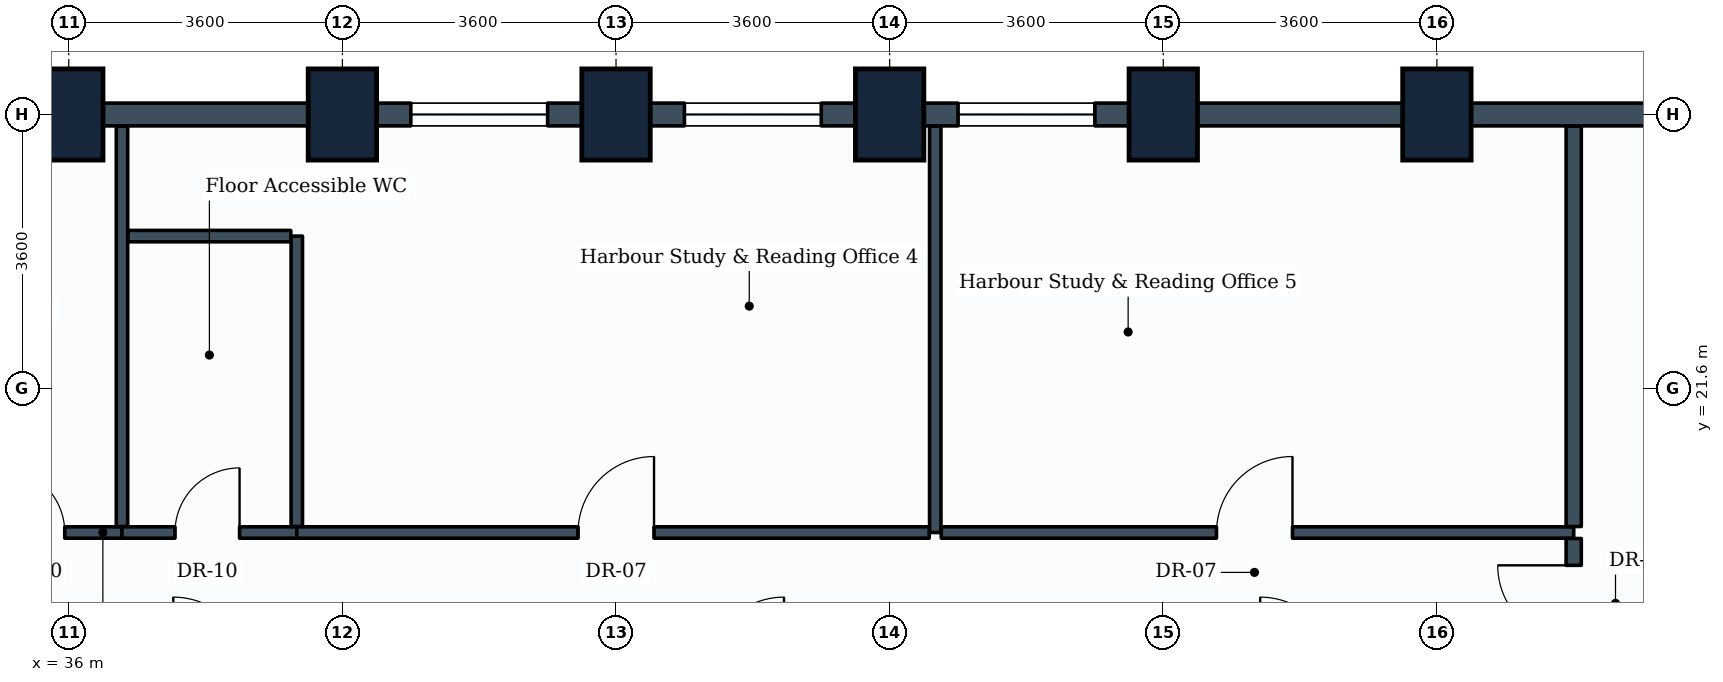
"""IFC4 building model, lengths in metres.
Left out: names, types, materials, properties, quantities, classifications, styles, units other than length and angle.
Written with IfcOpenShell. Run it as: python <this file> out.ifc"""

import sys

from ifc_helpers import new_model, si_unit, direction, frame, frame_2d, origin, origin_2d, place, context, subcontext, project, spatial, rectangle, extrude, element, fill, save


model = new_model("IFC4")
c1 = context("Model", 3, precision=1e-05, world=origin(), true_north=direction((0.0, 1.0)))
c2 = subcontext(c1, "Body", "Model", "MODEL_VIEW")
j1 = project(units=[si_unit("LENGTHUNIT", "METRE"), si_unit("PLANEANGLEUNIT", "RADIAN")], contexts=[c1])
p1 = place(None, origin())
s1 = spatial("IfcSite", under=j1, at=p1, CompositionType="ELEMENT")
p2 = place(p1, origin())
s2 = spatial("IfcBuilding", under=s1, at=p2, CompositionType="ELEMENT")
p3 = place(p2, frame((0.0, 0.0, 47.4)))
s3 = spatial("IfcBuildingStorey", under=s2, at=p3, CompositionType="ELEMENT", Elevation=47.4)
for number, where, z_axis, x_axis in (
    (1, (36.0, 25.2, 0.0), (0.0, 0.0, 1.0), (1.0, 0.0, 0.0)),
    (2, (39.6, 25.2, 0.0), (0.0, 0.0, 1.0), (1.0, 0.0, 0.0)),
    (3, (43.2, 25.2, 0.0), (0.0, 0.0, 1.0), (1.0, 0.0, 0.0)),
    (4, (46.8, 25.2, 0.0), (0.0, 0.0, 1.0), (1.0, 0.0, 0.0)),
    (5, (50.4, 25.2, 0.0), (0.0, 0.0, 1.0), (1.0, 0.0, 0.0)),
    (6, (54.0, 25.2, 0.0), (0.0, 0.0, 1.0), (1.0, 0.0, 0.0)),
):
    element("IfcColumn", number, at=place(p3, frame(where, z_axis=z_axis, x_axis=x_axis)), inside=s3, PredefinedType="COLUMN", context=c2, shape_type="SweptSolid", body=[
        extrude(rectangle(XDim=0.9, YDim=1.2, at=origin_2d()), origin(), (0.0, 0.0, 1.0), 3.9),
    ])
for number, where, z_axis, x_axis in (
    (7, (54.0, 25.2, 0.0), (0.0, 0.0, 1.0), (1.0, 0.0, 0.0)),
    (8, (50.4, 25.2, 0.0), (0.0, 0.0, 1.0), (1.0, 0.0, 0.0)),
):
    element("IfcWall", number, at=place(p3, frame(where, z_axis=z_axis, x_axis=x_axis)), inside=s3, PredefinedType="STANDARD", context=c2, shape_type="SweptSolid", body=[
        extrude(rectangle(XDim=3.6, YDim=0.3, at=frame_2d((1.8, 0.0))), origin(), (0.0, 0.0, 1.0), 2.93),
    ])
p4 = place(p3, frame((46.8, 25.2, 0.0), z_axis=(0.0, 0.0, 1.0), x_axis=(1.0, 0.0, 0.0)))
e9 = element("IfcWall", 9, at=p4, inside=s3, PredefinedType="STANDARD", context=c2, shape_type="SweptSolid", body=[
    extrude(rectangle(XDim=3.6, YDim=0.3, at=frame_2d((1.8, 0.0))), origin(), (0.0, 0.0, 1.0), 2.93),
])
p5 = place(p4, frame((0.9, 0.0, 0.85)))
e10 = element("IfcOpeningElement", 10, at=p5, cuts=e9, PredefinedType="OPENING", context=c2, shape_type="SweptSolid", body=[
    extrude(rectangle(XDim=1.8, YDim=1.35, at=frame_2d((0.9, 0.675))), frame((0.0, 0.16, 0.0), z_axis=(0.0, -1.0, 0.0), x_axis=(1.0, 0.0, 0.0)), (0.0, 0.0, 1.0), 0.32),
])
p6 = place(p3, frame((43.2, 25.2, 0.0), z_axis=(0.0, 0.0, 1.0), x_axis=(1.0, 0.0, 0.0)))
e11 = element("IfcWall", 11, at=p6, inside=s3, PredefinedType="STANDARD", context=c2, shape_type="SweptSolid", body=[
    extrude(rectangle(XDim=3.6, YDim=0.3, at=frame_2d((1.8, 0.0))), origin(), (0.0, 0.0, 1.0), 2.93),
])
p7 = place(p6, frame((0.9, 0.0, 0.85)))
e12 = element("IfcOpeningElement", 12, at=p7, cuts=e11, PredefinedType="OPENING", context=c2, shape_type="SweptSolid", body=[
    extrude(rectangle(XDim=1.8, YDim=1.35, at=frame_2d((0.9, 0.675))), frame((0.0, 0.16, 0.0), z_axis=(0.0, -1.0, 0.0), x_axis=(1.0, 0.0, 0.0)), (0.0, 0.0, 1.0), 0.32),
])
p8 = place(p3, frame((39.6, 25.2, 0.0), z_axis=(0.0, 0.0, 1.0), x_axis=(1.0, 0.0, 0.0)))
e13 = element("IfcWall", 13, at=p8, inside=s3, PredefinedType="STANDARD", context=c2, shape_type="SweptSolid", body=[
    extrude(rectangle(XDim=3.6, YDim=0.3, at=frame_2d((1.8, 0.0))), origin(), (0.0, 0.0, 1.0), 2.93),
])
p9 = place(p8, frame((0.9, 0.0, 0.85)))
e14 = element("IfcOpeningElement", 14, at=p9, cuts=e13, PredefinedType="OPENING", context=c2, shape_type="SweptSolid", body=[
    extrude(rectangle(XDim=1.8, YDim=1.35, at=frame_2d((0.9, 0.675))), frame((0.0, 0.16, 0.0), z_axis=(0.0, -1.0, 0.0), x_axis=(1.0, 0.0, 0.0)), (0.0, 0.0, 1.0), 0.32),
])
for number, where, z_axis, x_axis in (
    (15, (36.0, 25.2, 0.0), (0.0, 0.0, 1.0), (1.0, 0.0, 0.0)),
    (16, (32.4, 25.2, 0.0), (0.0, 0.0, 1.0), (1.0, 0.0, 0.0)),
):
    element("IfcWall", number, at=place(p3, frame(where, z_axis=z_axis, x_axis=x_axis)), inside=s3, PredefinedType="STANDARD", context=c2, shape_type="SweptSolid", body=[
        extrude(rectangle(XDim=3.6, YDim=0.3, at=frame_2d((1.8, 0.0))), origin(), (0.0, 0.0, 1.0), 2.93),
    ])
p10 = place(p3, frame((34.479, 19.7, 0.0), z_axis=(0.0, 0.0, 1.0), x_axis=(1.0, 0.0, 0.0)))
e17 = element("IfcWall", 17, at=p10, inside=s3, PredefinedType="PARTITIONING", context=c2, shape_type="SweptSolid", body=[
    extrude(rectangle(XDim=2.221, YDim=0.15, at=frame_2d((1.11, 0.0))), origin(), (0.0, 0.0, 1.0), 3.08),
])
p11 = place(p10, frame((0.618, 0.0, 0.0)))
e18 = element("IfcOpeningElement", 18, at=p11, cuts=e17, PredefinedType="OPENING", context=c2, shape_type="SweptSolid", body=[
    extrude(rectangle(XDim=0.85, YDim=2.1, at=frame_2d((0.425, 1.05))), frame((0.0, 0.085, 0.0), z_axis=(0.0, -1.0, 0.0), x_axis=(1.0, 0.0, 0.0)), (0.0, 0.0, 1.0), 0.17),
])
p12 = place(p3, frame((36.7, 19.779, 0.0), z_axis=(0.0, 0.0, 1.0), x_axis=(0.0, 1.0, 0.0)))
e19 = element("IfcWall", 19, at=p12, inside=s3, PredefinedType="PARTITIONING", context=c2, shape_type="SweptSolid", body=[
    extrude(rectangle(XDim=5.267, YDim=0.15, at=frame_2d((2.633, 0.0))), origin(), (0.0, 0.0, 1.0), 2.93),
])
p13 = place(p3, frame((36.7, 19.7, 0.0), z_axis=(0.0, 0.0, 1.0), x_axis=(1.0, 0.0, 0.0)))
e20 = element("IfcWall", 20, at=p13, inside=s3, PredefinedType="PARTITIONING", context=c2, shape_type="SweptSolid", body=[
    extrude(rectangle(XDim=2.3, YDim=0.15, at=frame_2d((1.15, 0.0))), origin(), (0.0, 0.0, 1.0), 3.635),
])
p14 = place(p13, frame((0.697, 0.0, 0.0)))
e21 = element("IfcOpeningElement", 21, at=p14, cuts=e20, PredefinedType="OPENING", context=c2, shape_type="SweptSolid", body=[
    extrude(rectangle(XDim=0.85, YDim=2.1, at=frame_2d((0.425, 1.05))), frame((0.0, 0.085, 0.0), z_axis=(0.0, -1.0, 0.0), x_axis=(1.0, 0.0, 0.0)), (0.0, 0.0, 1.0), 0.17),
])
p15 = place(p3, frame((39.0, 19.779, 0.0), z_axis=(0.0, 0.0, 1.0), x_axis=(0.0, 1.0, 0.0)))
e22 = element("IfcWall", 22, at=p15, inside=s3, PredefinedType="PARTITIONING", context=c2, shape_type="SweptSolid", body=[
    extrude(rectangle(XDim=3.821, YDim=0.15, at=frame_2d((1.911, 0.0))), origin(), (0.0, 0.0, 1.0), 3.03),
])
p16 = place(p3, frame((36.779, 23.6, 0.0), z_axis=(0.0, 0.0, 1.0), x_axis=(1.0, 0.0, 0.0)))
e23 = element("IfcWall", 23, at=p16, inside=s3, PredefinedType="PARTITIONING", context=c2, shape_type="SweptSolid", body=[
    extrude(rectangle(XDim=2.142, YDim=0.15, at=frame_2d((1.071, 0.0))), origin(), (0.0, 0.0, 1.0), 3.635),
])
p17 = place(p3, frame((47.4, 19.7, 0.0), z_axis=(0.0, 0.0, 1.0), x_axis=(0.0, 1.0, 0.0)))
e24 = element("IfcWall", 24, at=p17, inside=s3, PredefinedType="PARTITIONING", context=c2, shape_type="SweptSolid", body=[
    extrude(rectangle(XDim=5.346, YDim=0.15, at=frame_2d((2.673, 0.0))), origin(), (0.0, 0.0, 1.0), 2.93),
])
p18 = place(p3, frame((39.0, 19.7, 0.0), z_axis=(0.0, 0.0, 1.0), x_axis=(1.0, 0.0, 0.0)))
e25 = element("IfcWall", 25, at=p18, inside=s3, PredefinedType="PARTITIONING", context=c2, shape_type="SweptSolid", body=[
    extrude(rectangle(XDim=8.321, YDim=0.15, at=frame_2d((4.161, 0.0))), origin(), (0.0, 0.0, 1.0), 3.04),
])
p19 = place(p18, frame((3.7, 0.0, 0.0)))
e26 = element("IfcOpeningElement", 26, at=p19, cuts=e25, PredefinedType="OPENING", context=c2, shape_type="SweptSolid", body=[
    extrude(rectangle(XDim=1.0, YDim=2.1, at=frame_2d((0.5, 1.05))), frame((0.0, 0.085, 0.0), z_axis=(0.0, -1.0, 0.0), x_axis=(1.0, 0.0, 0.0)), (0.0, 0.0, 1.0), 0.17),
])
p20 = place(p3, frame((47.479, 19.7, 0.0), z_axis=(0.0, 0.0, 1.0), x_axis=(1.0, 0.0, 0.0)))
e27 = element("IfcWall", 27, at=p20, inside=s3, PredefinedType="PARTITIONING", context=c2, shape_type="SweptSolid", body=[
    extrude(rectangle(XDim=8.321, YDim=0.15, at=frame_2d((4.161, 0.0))), origin(), (0.0, 0.0, 1.0), 3.04),
])
p21 = place(p20, frame((3.621, 0.0, 0.0)))
e28 = element("IfcOpeningElement", 28, at=p21, cuts=e27, PredefinedType="OPENING", context=c2, shape_type="SweptSolid", body=[
    extrude(rectangle(XDim=1.0, YDim=2.1, at=frame_2d((0.5, 1.05))), frame((0.0, 0.085, 0.0), z_axis=(0.0, -1.0, 0.0), x_axis=(1.0, 0.0, 0.0)), (0.0, 0.0, 1.0), 0.17),
])
p22 = place(p3, frame((55.8, 19.779, 0.0), z_axis=(0.0, 0.0, 1.0), x_axis=(0.0, 1.0, 0.0)))
e29 = element("IfcWall", 29, at=p22, inside=s3, PredefinedType="PARTITIONING", context=c2, shape_type="SweptSolid", body=[
    extrude(rectangle(XDim=5.267, YDim=0.2, at=frame_2d((2.633, 0.0))), origin(), (0.0, 0.0, 1.0), 2.93),
])
p23 = place(p3, frame((55.8, 17.929, 0.0), z_axis=(0.0, 0.0, 1.0), x_axis=(0.0, 1.0, 0.0)))
e30 = element("IfcWall", 30, at=p23, inside=s3, PredefinedType="PARTITIONING", context=c2, shape_type="SweptSolid", body=[
    extrude(rectangle(XDim=1.692, YDim=0.2, at=frame_2d((0.846, 0.0))), origin(), (0.0, 0.0, 1.0), 3.635),
])
p24 = place(p23, frame((0.339, 0.0, 0.0)))
e31 = element("IfcOpeningElement", 31, at=p24, cuts=e30, PredefinedType="OPENING", context=c2, shape_type="SweptSolid", body=[
    extrude(rectangle(XDim=1.0, YDim=2.1, at=frame_2d((0.5, 1.05))), frame((0.0, 0.11, 0.0), z_axis=(0.0, -1.0, 0.0), x_axis=(1.0, 0.0, 0.0)), (0.0, 0.0, 1.0), 0.22),
])
p25 = place(p5, origin())
e32 = element("IfcWindow", 32, at=p25, inside=s3, PartitioningType="SINGLE_PANEL", PredefinedType="WINDOW", context=c2, shape_type="SweptSolid", body=[
    extrude(rectangle(XDim=1.8, YDim=1.35, at=frame_2d((0.9, 0.675))), frame((0.0, 0.03, 0.0), z_axis=(0.0, -1.0, 0.0), x_axis=(1.0, 0.0, 0.0)), (0.0, 0.0, 1.0), 0.06),
])
fill(e10, e32)
p26 = place(p7, origin())
e33 = element("IfcWindow", 33, at=p26, inside=s3, PartitioningType="SINGLE_PANEL", PredefinedType="WINDOW", context=c2, shape_type="SweptSolid", body=[
    extrude(rectangle(XDim=1.8, YDim=1.35, at=frame_2d((0.9, 0.675))), frame((0.0, 0.03, 0.0), z_axis=(0.0, -1.0, 0.0), x_axis=(1.0, 0.0, 0.0)), (0.0, 0.0, 1.0), 0.06),
])
fill(e12, e33)
p27 = place(p9, origin())
e34 = element("IfcWindow", 34, at=p27, inside=s3, PartitioningType="SINGLE_PANEL", PredefinedType="WINDOW", context=c2, shape_type="SweptSolid", body=[
    extrude(rectangle(XDim=1.8, YDim=1.35, at=frame_2d((0.9, 0.675))), frame((0.0, 0.03, 0.0), z_axis=(0.0, -1.0, 0.0), x_axis=(1.0, 0.0, 0.0)), (0.0, 0.0, 1.0), 0.06),
])
fill(e14, e34)
p28 = place(p11, origin())
e35 = element("IfcDoor", 35, at=p28, inside=s3, OperationType="SINGLE_SWING_LEFT", PredefinedType="DOOR", context=c2, shape_type="SweptSolid", body=[
    extrude(rectangle(XDim=0.85, YDim=2.1, at=frame_2d((0.425, 1.05))), frame((0.0, 0.025, 0.0), z_axis=(0.0, -1.0, 0.0), x_axis=(1.0, 0.0, 0.0)), (0.0, 0.0, 1.0), 0.05),
])
fill(e18, e35)
p29 = place(p14, origin())
e36 = element("IfcDoor", 36, at=p29, inside=s3, OperationType="SINGLE_SWING_RIGHT", PredefinedType="DOOR", context=c2, shape_type="SweptSolid", body=[
    extrude(rectangle(XDim=0.85, YDim=2.1, at=frame_2d((0.425, 1.05))), frame((0.0, 0.025, 0.0), z_axis=(0.0, -1.0, 0.0), x_axis=(1.0, 0.0, 0.0)), (0.0, 0.0, 1.0), 0.05),
])
fill(e21, e36)
p30 = place(p19, origin())
e37 = element("IfcDoor", 37, at=p30, inside=s3, OperationType="SINGLE_SWING_RIGHT", PredefinedType="DOOR", context=c2, shape_type="SweptSolid", body=[
    extrude(rectangle(XDim=1.0, YDim=2.1, at=frame_2d((0.5, 1.05))), frame((0.0, 0.025, 0.0), z_axis=(0.0, -1.0, 0.0), x_axis=(1.0, 0.0, 0.0)), (0.0, 0.0, 1.0), 0.05),
])
fill(e26, e37)
p31 = place(p21, origin())
e38 = element("IfcDoor", 38, at=p31, inside=s3, OperationType="SINGLE_SWING_RIGHT", PredefinedType="DOOR", context=c2, shape_type="SweptSolid", body=[
    extrude(rectangle(XDim=1.0, YDim=2.1, at=frame_2d((0.5, 1.05))), frame((0.0, 0.025, 0.0), z_axis=(0.0, -1.0, 0.0), x_axis=(1.0, 0.0, 0.0)), (0.0, 0.0, 1.0), 0.05),
])
fill(e28, e38)
p32 = place(p24, origin())
e39 = element("IfcDoor", 39, at=p32, inside=s3, OperationType="SINGLE_SWING_RIGHT", PredefinedType="DOOR", context=c2, shape_type="SweptSolid", body=[
    extrude(rectangle(XDim=1.0, YDim=2.1, at=frame_2d((0.5, 1.05))), frame((0.0, 0.025, 0.0), z_axis=(0.0, -1.0, 0.0), x_axis=(1.0, 0.0, 0.0)), (0.0, 0.0, 1.0), 0.05),
])
fill(e31, e39)
save(model, sys.argv[1])
